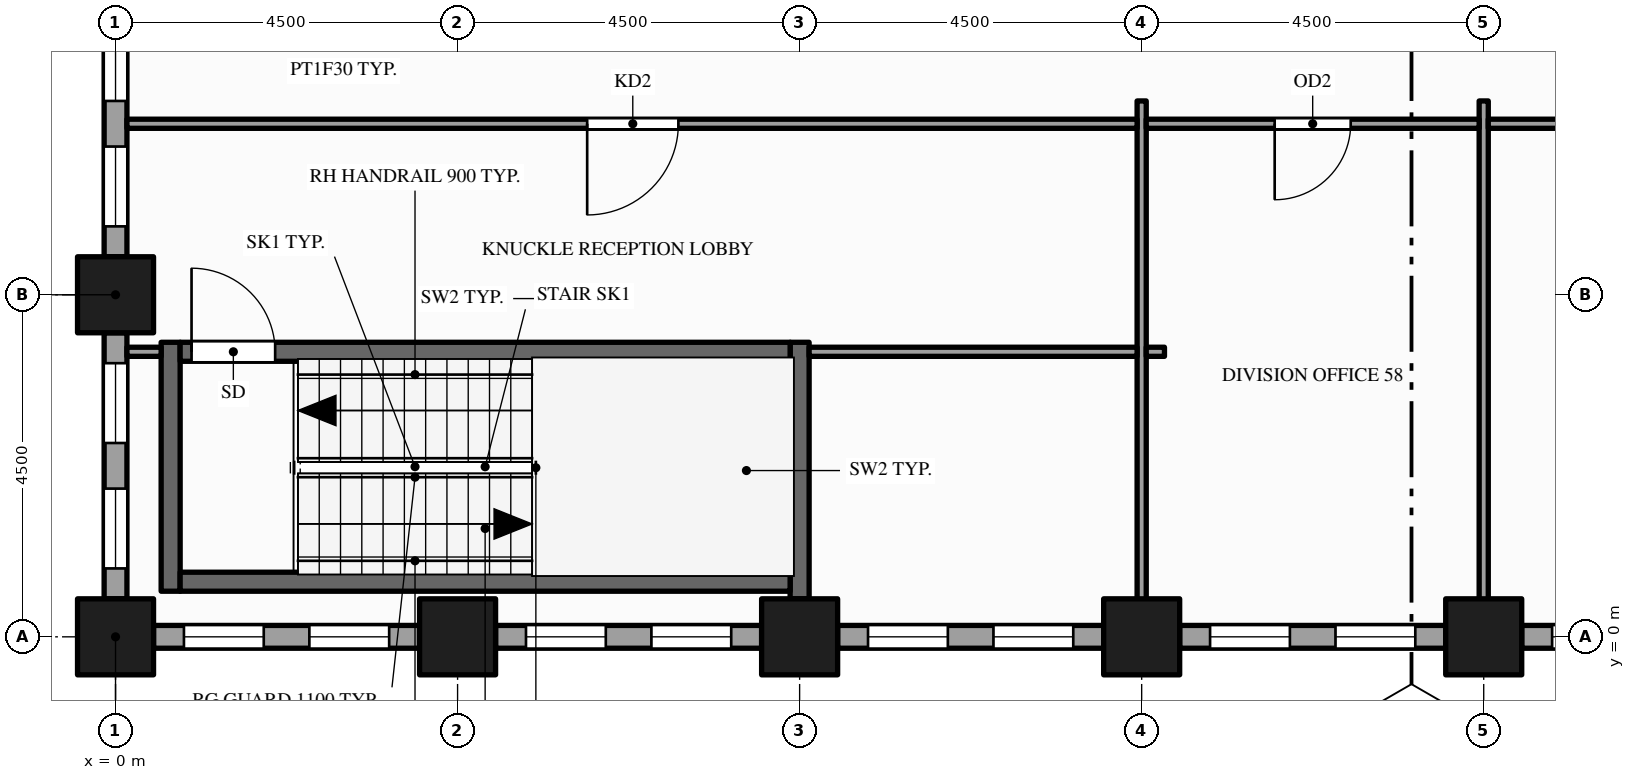
"""IFC4 building model, lengths in metres.
Left out: names, types, materials, properties, quantities, classifications, styles, units other than length and angle.
Written with IfcOpenShell. Run it as: python <this file> out.ifc"""

import sys

from ifc_helpers import new_model, si_unit, direction, frame, frame_2d, origin, origin_2d, place, context, subcontext, project, spatial, rectangle, hollow_rectangle, extrude, element, fill, save


model = new_model("IFC4")
c1 = context("Model", 3, precision=1e-05, world=origin(), true_north=direction((0.0, 1.0)))
c2 = subcontext(c1, "Body", "Model", "MODEL_VIEW")
j1 = project(units=[si_unit("LENGTHUNIT", "METRE"), si_unit("PLANEANGLEUNIT", "RADIAN")], contexts=[c1])
p1 = place(None, origin())
s1 = spatial("IfcSite", under=j1, at=p1, CompositionType="ELEMENT")
p2 = place(p1, origin())
s2 = spatial("IfcBuilding", under=s1, at=p2, CompositionType="ELEMENT")
p3 = place(p2, frame((0.0, 0.0, 103.0)))
s3 = spatial("IfcBuildingStorey", under=s2, at=p3, CompositionType="ELEMENT", Elevation=103.0)
for number, where, z_axis, x_axis in (
    (1, (0.0, 0.0, -0.15), (0.0, 0.0, 1.0), (1.0, 0.0, 0.0)),
    (2, (0.0, 4.5, -0.15), (0.0, 0.0, 1.0), (1.0, 0.0, 0.0)),
    (3, (4.5, 0.0, -0.15), (0.0, 0.0, 1.0), (1.0, 0.0, 0.0)),
    (4, (9.0, 0.0, -0.15), (0.0, 0.0, 1.0), (1.0, 0.0, 0.0)),
    (5, (13.5, 0.0, -0.15), (0.0, 0.0, 1.0), (1.0, 0.0, 0.0)),
    (6, (18.0, 0.0, -0.15), (0.0, 0.0, 1.0), (1.0, 0.0, 0.0)),
):
    element("IfcColumn", number, at=place(p3, frame(where, z_axis=z_axis, x_axis=x_axis)), inside=s3, PredefinedType="COLUMN", context=c2, shape_type="SweptSolid", body=[
        extrude(hollow_rectangle(XDim=1.0, YDim=1.0, WallThickness=0.05, at=origin_2d()), origin(), (0.0, 0.0, 1.0), 4.0),
    ])
p4 = place(p3, frame((0.0, 8.5, 0.0), z_axis=(0.0, 0.0, 1.0), x_axis=(0.0, -1.0, 0.0)))
e7 = element("IfcWall", 7, at=p4, inside=s3, PredefinedType="STANDARD", context=c2, shape_type="SweptSolid", body=[
    extrude(rectangle(XDim=3.5, YDim=0.3, at=frame_2d((1.75, 0.0))), origin(), (0.0, 0.0, 1.0), 3.154),
])
p5 = place(p4, frame((0.4, 0.0, 0.9)))
e8 = element("IfcOpeningElement", 8, at=p5, cuts=e7, PredefinedType="OPENING", context=c2, shape_type="SweptSolid", body=[
    extrude(rectangle(XDim=1.05, YDim=2.0, at=frame_2d((0.525, 1.0))), frame((0.0, 0.16, 0.0), z_axis=(0.0, -1.0, 0.0), x_axis=(1.0, 0.0, 0.0)), (0.0, 0.0, 1.0), 0.32),
])
p6 = place(p4, frame((2.05, 0.0, 0.9)))
e9 = element("IfcOpeningElement", 9, at=p6, cuts=e7, PredefinedType="OPENING", context=c2, shape_type="SweptSolid", body=[
    extrude(rectangle(XDim=1.05, YDim=2.0, at=frame_2d((0.525, 1.0))), frame((0.0, 0.16, 0.0), z_axis=(0.0, -1.0, 0.0), x_axis=(1.0, 0.0, 0.0)), (0.0, 0.0, 1.0), 0.32),
])
p7 = place(p3, frame((0.0, 4.0, 0.0), z_axis=(0.0, 0.0, 1.0), x_axis=(0.0, -1.0, 0.0)))
e10 = element("IfcWall", 10, at=p7, inside=s3, PredefinedType="STANDARD", context=c2, shape_type="SweptSolid", body=[
    extrude(rectangle(XDim=3.5, YDim=0.3, at=frame_2d((1.75, 0.0))), origin(), (0.0, 0.0, 1.0), 3.154),
])
p8 = place(p7, frame((0.4, 0.0, 0.9)))
e11 = element("IfcOpeningElement", 11, at=p8, cuts=e10, PredefinedType="OPENING", context=c2, shape_type="SweptSolid", body=[
    extrude(rectangle(XDim=1.05, YDim=2.0, at=frame_2d((0.525, 1.0))), frame((0.0, 0.16, 0.0), z_axis=(0.0, -1.0, 0.0), x_axis=(1.0, 0.0, 0.0)), (0.0, 0.0, 1.0), 0.32),
])
p9 = place(p7, frame((2.05, 0.0, 0.9)))
e12 = element("IfcOpeningElement", 12, at=p9, cuts=e10, PredefinedType="OPENING", context=c2, shape_type="SweptSolid", body=[
    extrude(rectangle(XDim=1.05, YDim=2.0, at=frame_2d((0.525, 1.0))), frame((0.0, 0.16, 0.0), z_axis=(0.0, -1.0, 0.0), x_axis=(1.0, 0.0, 0.0)), (0.0, 0.0, 1.0), 0.32),
])
p10 = place(p3, frame((0.5, 0.0, 0.0), z_axis=(0.0, 0.0, 1.0), x_axis=(1.0, 0.0, 0.0)))
e13 = element("IfcWall", 13, at=p10, inside=s3, PredefinedType="STANDARD", context=c2, shape_type="SweptSolid", body=[
    extrude(rectangle(XDim=3.5, YDim=0.3, at=frame_2d((1.75, 0.0))), origin(), (0.0, 0.0, 1.0), 3.154),
])
p11 = place(p10, frame((0.4, 0.0, 0.9)))
e14 = element("IfcOpeningElement", 14, at=p11, cuts=e13, PredefinedType="OPENING", context=c2, shape_type="SweptSolid", body=[
    extrude(rectangle(XDim=1.05, YDim=2.0, at=frame_2d((0.525, 1.0))), frame((0.0, 0.16, 0.0), z_axis=(0.0, -1.0, 0.0), x_axis=(1.0, 0.0, 0.0)), (0.0, 0.0, 1.0), 0.32),
])
p12 = place(p10, frame((2.05, 0.0, 0.9)))
e15 = element("IfcOpeningElement", 15, at=p12, cuts=e13, PredefinedType="OPENING", context=c2, shape_type="SweptSolid", body=[
    extrude(rectangle(XDim=1.05, YDim=2.0, at=frame_2d((0.525, 1.0))), frame((0.0, 0.16, 0.0), z_axis=(0.0, -1.0, 0.0), x_axis=(1.0, 0.0, 0.0)), (0.0, 0.0, 1.0), 0.32),
])
p13 = place(p3, frame((5.0, 0.0, 0.0), z_axis=(0.0, 0.0, 1.0), x_axis=(1.0, 0.0, 0.0)))
e16 = element("IfcWall", 16, at=p13, inside=s3, PredefinedType="STANDARD", context=c2, shape_type="SweptSolid", body=[
    extrude(rectangle(XDim=3.5, YDim=0.3, at=frame_2d((1.75, 0.0))), origin(), (0.0, 0.0, 1.0), 3.154),
])
p14 = place(p13, frame((0.4, 0.0, 0.9)))
e17 = element("IfcOpeningElement", 17, at=p14, cuts=e16, PredefinedType="OPENING", context=c2, shape_type="SweptSolid", body=[
    extrude(rectangle(XDim=1.05, YDim=2.0, at=frame_2d((0.525, 1.0))), frame((0.0, 0.16, 0.0), z_axis=(0.0, -1.0, 0.0), x_axis=(1.0, 0.0, 0.0)), (0.0, 0.0, 1.0), 0.32),
])
p15 = place(p13, frame((2.05, 0.0, 0.9)))
e18 = element("IfcOpeningElement", 18, at=p15, cuts=e16, PredefinedType="OPENING", context=c2, shape_type="SweptSolid", body=[
    extrude(rectangle(XDim=1.05, YDim=2.0, at=frame_2d((0.525, 1.0))), frame((0.0, 0.16, 0.0), z_axis=(0.0, -1.0, 0.0), x_axis=(1.0, 0.0, 0.0)), (0.0, 0.0, 1.0), 0.32),
])
p16 = place(p3, frame((9.5, 0.0, 0.0), z_axis=(0.0, 0.0, 1.0), x_axis=(1.0, 0.0, 0.0)))
e19 = element("IfcWall", 19, at=p16, inside=s3, PredefinedType="STANDARD", context=c2, shape_type="SweptSolid", body=[
    extrude(rectangle(XDim=3.5, YDim=0.3, at=frame_2d((1.75, 0.0))), origin(), (0.0, 0.0, 1.0), 3.154),
])
p17 = place(p16, frame((0.4, 0.0, 0.9)))
e20 = element("IfcOpeningElement", 20, at=p17, cuts=e19, PredefinedType="OPENING", context=c2, shape_type="SweptSolid", body=[
    extrude(rectangle(XDim=1.05, YDim=2.0, at=frame_2d((0.525, 1.0))), frame((0.0, 0.16, 0.0), z_axis=(0.0, -1.0, 0.0), x_axis=(1.0, 0.0, 0.0)), (0.0, 0.0, 1.0), 0.32),
])
p18 = place(p16, frame((2.05, 0.0, 0.9)))
e21 = element("IfcOpeningElement", 21, at=p18, cuts=e19, PredefinedType="OPENING", context=c2, shape_type="SweptSolid", body=[
    extrude(rectangle(XDim=1.05, YDim=2.0, at=frame_2d((0.525, 1.0))), frame((0.0, 0.16, 0.0), z_axis=(0.0, -1.0, 0.0), x_axis=(1.0, 0.0, 0.0)), (0.0, 0.0, 1.0), 0.32),
])
p19 = place(p3, frame((14.0, 0.0, 0.0), z_axis=(0.0, 0.0, 1.0), x_axis=(1.0, 0.0, 0.0)))
e22 = element("IfcWall", 22, at=p19, inside=s3, PredefinedType="STANDARD", context=c2, shape_type="SweptSolid", body=[
    extrude(rectangle(XDim=3.5, YDim=0.3, at=frame_2d((1.75, 0.0))), origin(), (0.0, 0.0, 1.0), 3.154),
])
p20 = place(p19, frame((0.4, 0.0, 0.9)))
e23 = element("IfcOpeningElement", 23, at=p20, cuts=e22, PredefinedType="OPENING", context=c2, shape_type="SweptSolid", body=[
    extrude(rectangle(XDim=1.05, YDim=2.0, at=frame_2d((0.525, 1.0))), frame((0.0, 0.16, 0.0), z_axis=(0.0, -1.0, 0.0), x_axis=(1.0, 0.0, 0.0)), (0.0, 0.0, 1.0), 0.32),
])
p21 = place(p19, frame((2.05, 0.0, 0.9)))
e24 = element("IfcOpeningElement", 24, at=p21, cuts=e22, PredefinedType="OPENING", context=c2, shape_type="SweptSolid", body=[
    extrude(rectangle(XDim=1.05, YDim=2.0, at=frame_2d((0.525, 1.0))), frame((0.0, 0.16, 0.0), z_axis=(0.0, -1.0, 0.0), x_axis=(1.0, 0.0, 0.0)), (0.0, 0.0, 1.0), 0.32),
])
p22 = place(p3, frame((18.5, 0.0, 0.0), z_axis=(0.0, 0.0, 1.0), x_axis=(1.0, 0.0, 0.0)))
e25 = element("IfcWall", 25, at=p22, inside=s3, PredefinedType="STANDARD", context=c2, shape_type="SweptSolid", body=[
    extrude(rectangle(XDim=3.5, YDim=0.3, at=frame_2d((1.75, 0.0))), origin(), (0.0, 0.0, 1.0), 3.154),
])
p23 = place(p22, frame((0.4, 0.0, 0.9)))
e26 = element("IfcOpeningElement", 26, at=p23, cuts=e25, PredefinedType="OPENING", context=c2, shape_type="SweptSolid", body=[
    extrude(rectangle(XDim=1.05, YDim=2.0, at=frame_2d((0.525, 1.0))), frame((0.0, 0.16, 0.0), z_axis=(0.0, -1.0, 0.0), x_axis=(1.0, 0.0, 0.0)), (0.0, 0.0, 1.0), 0.32),
])
p24 = place(p22, frame((2.05, 0.0, 0.9)))
e27 = element("IfcOpeningElement", 27, at=p24, cuts=e25, PredefinedType="OPENING", context=c2, shape_type="SweptSolid", body=[
    extrude(rectangle(XDim=1.05, YDim=2.0, at=frame_2d((0.525, 1.0))), frame((0.0, 0.16, 0.0), z_axis=(0.0, -1.0, 0.0), x_axis=(1.0, 0.0, 0.0)), (0.0, 0.0, 1.0), 0.32),
])
p25 = place(p3, frame((0.725, 0.6, 0.0), z_axis=(0.0, 0.0, 1.0), x_axis=(0.0, 1.0, 0.0)))
e28 = element("IfcWall", 28, at=p25, inside=s3, PredefinedType="SHEAR", context=c2, shape_type="SweptSolid", body=[
    extrude(rectangle(XDim=3.275, YDim=0.25, at=frame_2d((1.637, 0.0))), origin(), (0.0, 0.0, 1.0), 3.85),
])
p26 = place(p3, frame((9.0, 0.5, 0.0), z_axis=(0.0, 0.0, 1.0), x_axis=(0.0, 1.0, 0.0)))
e29 = element("IfcWall", 29, at=p26, inside=s3, PredefinedType="SHEAR", context=c2, shape_type="SweptSolid", body=[
    extrude(rectangle(XDim=3.375, YDim=0.25, at=frame_2d((1.688, 0.0))), origin(), (0.0, 0.0, 1.0), 3.85),
])
for number, where, z_axis, x_axis in (
    (30, (13.5, 0.15, 0.0), (0.0, 0.0, 1.0), (0.0, 1.0, 0.0)),
    (31, (18.0, 0.15, 0.0), (0.0, 0.0, 1.0), (0.0, 1.0, 0.0)),
):
    element("IfcWall", number, at=place(p3, frame(where, z_axis=z_axis, x_axis=x_axis)), inside=s3, PredefinedType="PARTITIONING", context=c2, shape_type="SweptSolid", body=[
        extrude(rectangle(XDim=6.9, YDim=0.12, at=frame_2d((3.45, 0.0))), origin(), (0.0, 0.0, 1.0), 2.938),
    ])
p27 = place(p3, frame((0.85, 0.725, 0.0), z_axis=(0.0, 0.0, 1.0), x_axis=(1.0, 0.0, 0.0)))
e32 = element("IfcWall", 32, at=p27, inside=s3, PredefinedType="SHEAR", context=c2, shape_type="SweptSolid", body=[
    extrude(rectangle(XDim=8.025, YDim=0.25, at=frame_2d((4.012, 0.0))), origin(), (0.0, 0.0, 1.0), 3.85),
])
p28 = place(p3, frame((0.15, 3.75, 0.0), z_axis=(0.0, 0.0, 1.0), x_axis=(1.0, 0.0, 0.0)))
e33 = element("IfcWall", 33, at=p28, inside=s3, PredefinedType="PARTITIONING", context=c2, shape_type="SweptSolid", body=[
    extrude(rectangle(XDim=0.45, YDim=0.12, at=frame_2d((0.225, 0.0))), origin(), (0.0, 0.0, 1.0), 3.154),
])
p29 = place(p3, frame((0.85, 3.75, 0.0), z_axis=(0.0, 0.0, 1.0), x_axis=(1.0, 0.0, 0.0)))
e34 = element("IfcWall", 34, at=p29, inside=s3, PredefinedType="SHEAR", context=c2, shape_type="SweptSolid", body=[
    extrude(rectangle(XDim=8.025, YDim=0.25, at=frame_2d((4.012, 0.0))), origin(), (0.0, 0.0, 1.0), 3.85),
])
p30 = place(p29, frame((0.15, 0.0, 0.0)))
e35 = element("IfcOpeningElement", 35, at=p30, cuts=e34, PredefinedType="OPENING", context=c2, shape_type="SweptSolid", body=[
    extrude(rectangle(XDim=1.1, YDim=2.1, at=frame_2d((0.55, 1.05))), frame((0.0, 0.135, 0.0), z_axis=(0.0, -1.0, 0.0), x_axis=(1.0, 0.0, 0.0)), (0.0, 0.0, 1.0), 0.27),
])
p31 = place(p3, frame((9.125, 3.75, 0.0), z_axis=(0.0, 0.0, 1.0), x_axis=(1.0, 0.0, 0.0)))
e36 = element("IfcWall", 36, at=p31, inside=s3, PredefinedType="PARTITIONING", context=c2, shape_type="SweptSolid", body=[
    extrude(rectangle(XDim=4.315, YDim=0.12, at=frame_2d((2.157, 0.0))), origin(), (0.0, 0.0, 1.0), 2.938),
])
p32 = place(p3, frame((13.56, 3.75, 0.0), z_axis=(0.0, 0.0, 1.0), x_axis=(1.0, 0.0, 0.0)))
e37 = element("IfcWall", 37, at=p32, inside=s3, PredefinedType="PARTITIONING", context=c2, shape_type="SweptSolid", body=[
    extrude(rectangle(XDim=0.24, YDim=0.12, at=frame_2d((0.12, 0.0))), origin(), (0.0, 0.0, 1.0), 2.938),
])
p33 = place(p3, frame((0.15, 6.75, 0.0), z_axis=(0.0, 0.0, 1.0), x_axis=(1.0, 0.0, 0.0)))
e38 = element("IfcWall", 38, at=p33, inside=s3, PredefinedType="PARTITIONING", context=c2, shape_type="SweptSolid", body=[
    extrude(rectangle(XDim=13.29, YDim=0.12, at=frame_2d((6.645, 0.0))), origin(), (0.0, 0.0, 1.0), 2.938),
])
p34 = place(p33, frame((6.055, 0.0, 0.0)))
e39 = element("IfcOpeningElement", 39, at=p34, cuts=e38, PredefinedType="OPENING", context=c2, shape_type="SweptSolid", body=[
    extrude(rectangle(XDim=1.2, YDim=2.1, at=frame_2d((0.6, 1.05))), frame((0.0, 0.07, 0.0), z_axis=(0.0, -1.0, 0.0), x_axis=(1.0, 0.0, 0.0)), (0.0, 0.0, 1.0), 0.14),
])
p35 = place(p3, frame((13.56, 6.75, 0.0), z_axis=(0.0, 0.0, 1.0), x_axis=(1.0, 0.0, 0.0)))
e40 = element("IfcWall", 40, at=p35, inside=s3, PredefinedType="PARTITIONING", context=c2, shape_type="SweptSolid", body=[
    extrude(rectangle(XDim=4.38, YDim=0.12, at=frame_2d((2.19, 0.0))), origin(), (0.0, 0.0, 1.0), 2.938),
])
p36 = place(p35, frame((1.69, 0.0, 0.0)))
e41 = element("IfcOpeningElement", 41, at=p36, cuts=e40, PredefinedType="OPENING", context=c2, shape_type="SweptSolid", body=[
    extrude(rectangle(XDim=1.0, YDim=2.1, at=frame_2d((0.5, 1.05))), frame((0.0, 0.07, 0.0), z_axis=(0.0, -1.0, 0.0), x_axis=(1.0, 0.0, 0.0)), (0.0, 0.0, 1.0), 0.14),
])
p37 = place(p3, frame((18.06, 6.75, 0.0), z_axis=(0.0, 0.0, 1.0), x_axis=(1.0, 0.0, 0.0)))
e42 = element("IfcWall", 42, at=p37, inside=s3, PredefinedType="PARTITIONING", context=c2, shape_type="SweptSolid", body=[
    extrude(rectangle(XDim=4.38, YDim=0.12, at=frame_2d((2.19, 0.0))), origin(), (0.0, 0.0, 1.0), 2.938),
])
p38 = place(p37, frame((1.69, 0.0, 0.0)))
e43 = element("IfcOpeningElement", 43, at=p38, cuts=e42, PredefinedType="OPENING", context=c2, shape_type="SweptSolid", body=[
    extrude(rectangle(XDim=1.0, YDim=2.1, at=frame_2d((0.5, 1.05))), frame((0.0, 0.07, 0.0), z_axis=(0.0, -1.0, 0.0), x_axis=(1.0, 0.0, 0.0)), (0.0, 0.0, 1.0), 0.14),
])
p39 = place(p5, origin())
e44 = element("IfcWindow", 44, at=p39, inside=s3, PartitioningType="SINGLE_PANEL", PredefinedType="WINDOW", context=c2, shape_type="SweptSolid", body=[
    extrude(rectangle(XDim=1.05, YDim=2.0, at=frame_2d((0.525, 1.0))), frame((0.0, 0.03, 0.0), z_axis=(0.0, -1.0, 0.0), x_axis=(1.0, 0.0, 0.0)), (0.0, 0.0, 1.0), 0.06),
])
fill(e8, e44)
p40 = place(p6, origin())
e45 = element("IfcWindow", 45, at=p40, inside=s3, PartitioningType="SINGLE_PANEL", PredefinedType="WINDOW", context=c2, shape_type="SweptSolid", body=[
    extrude(rectangle(XDim=1.05, YDim=2.0, at=frame_2d((0.525, 1.0))), frame((0.0, 0.03, 0.0), z_axis=(0.0, -1.0, 0.0), x_axis=(1.0, 0.0, 0.0)), (0.0, 0.0, 1.0), 0.06),
])
fill(e9, e45)
p41 = place(p8, origin())
e46 = element("IfcWindow", 46, at=p41, inside=s3, PartitioningType="SINGLE_PANEL", PredefinedType="WINDOW", context=c2, shape_type="SweptSolid", body=[
    extrude(rectangle(XDim=1.05, YDim=2.0, at=frame_2d((0.525, 1.0))), frame((0.0, 0.03, 0.0), z_axis=(0.0, -1.0, 0.0), x_axis=(1.0, 0.0, 0.0)), (0.0, 0.0, 1.0), 0.06),
])
fill(e11, e46)
p42 = place(p9, origin())
e47 = element("IfcWindow", 47, at=p42, inside=s3, PartitioningType="SINGLE_PANEL", PredefinedType="WINDOW", context=c2, shape_type="SweptSolid", body=[
    extrude(rectangle(XDim=1.05, YDim=2.0, at=frame_2d((0.525, 1.0))), frame((0.0, 0.03, 0.0), z_axis=(0.0, -1.0, 0.0), x_axis=(1.0, 0.0, 0.0)), (0.0, 0.0, 1.0), 0.06),
])
fill(e12, e47)
p43 = place(p11, origin())
e48 = element("IfcWindow", 48, at=p43, inside=s3, PartitioningType="SINGLE_PANEL", PredefinedType="WINDOW", context=c2, shape_type="SweptSolid", body=[
    extrude(rectangle(XDim=1.05, YDim=2.0, at=frame_2d((0.525, 1.0))), frame((0.0, 0.03, 0.0), z_axis=(0.0, -1.0, 0.0), x_axis=(1.0, 0.0, 0.0)), (0.0, 0.0, 1.0), 0.06),
])
fill(e14, e48)
p44 = place(p12, origin())
e49 = element("IfcWindow", 49, at=p44, inside=s3, PartitioningType="SINGLE_PANEL", PredefinedType="WINDOW", context=c2, shape_type="SweptSolid", body=[
    extrude(rectangle(XDim=1.05, YDim=2.0, at=frame_2d((0.525, 1.0))), frame((0.0, 0.03, 0.0), z_axis=(0.0, -1.0, 0.0), x_axis=(1.0, 0.0, 0.0)), (0.0, 0.0, 1.0), 0.06),
])
fill(e15, e49)
p45 = place(p14, origin())
e50 = element("IfcWindow", 50, at=p45, inside=s3, PartitioningType="SINGLE_PANEL", PredefinedType="WINDOW", context=c2, shape_type="SweptSolid", body=[
    extrude(rectangle(XDim=1.05, YDim=2.0, at=frame_2d((0.525, 1.0))), frame((0.0, 0.03, 0.0), z_axis=(0.0, -1.0, 0.0), x_axis=(1.0, 0.0, 0.0)), (0.0, 0.0, 1.0), 0.06),
])
fill(e17, e50)
p46 = place(p15, origin())
e51 = element("IfcWindow", 51, at=p46, inside=s3, PartitioningType="SINGLE_PANEL", PredefinedType="WINDOW", context=c2, shape_type="SweptSolid", body=[
    extrude(rectangle(XDim=1.05, YDim=2.0, at=frame_2d((0.525, 1.0))), frame((0.0, 0.03, 0.0), z_axis=(0.0, -1.0, 0.0), x_axis=(1.0, 0.0, 0.0)), (0.0, 0.0, 1.0), 0.06),
])
fill(e18, e51)
p47 = place(p17, origin())
e52 = element("IfcWindow", 52, at=p47, inside=s3, PartitioningType="SINGLE_PANEL", PredefinedType="WINDOW", context=c2, shape_type="SweptSolid", body=[
    extrude(rectangle(XDim=1.05, YDim=2.0, at=frame_2d((0.525, 1.0))), frame((0.0, 0.03, 0.0), z_axis=(0.0, -1.0, 0.0), x_axis=(1.0, 0.0, 0.0)), (0.0, 0.0, 1.0), 0.06),
])
fill(e20, e52)
p48 = place(p18, origin())
e53 = element("IfcWindow", 53, at=p48, inside=s3, PartitioningType="SINGLE_PANEL", PredefinedType="WINDOW", context=c2, shape_type="SweptSolid", body=[
    extrude(rectangle(XDim=1.05, YDim=2.0, at=frame_2d((0.525, 1.0))), frame((0.0, 0.03, 0.0), z_axis=(0.0, -1.0, 0.0), x_axis=(1.0, 0.0, 0.0)), (0.0, 0.0, 1.0), 0.06),
])
fill(e21, e53)
p49 = place(p20, origin())
e54 = element("IfcWindow", 54, at=p49, inside=s3, PartitioningType="SINGLE_PANEL", PredefinedType="WINDOW", context=c2, shape_type="SweptSolid", body=[
    extrude(rectangle(XDim=1.05, YDim=2.0, at=frame_2d((0.525, 1.0))), frame((0.0, 0.03, 0.0), z_axis=(0.0, -1.0, 0.0), x_axis=(1.0, 0.0, 0.0)), (0.0, 0.0, 1.0), 0.06),
])
fill(e23, e54)
p50 = place(p21, origin())
e55 = element("IfcWindow", 55, at=p50, inside=s3, PartitioningType="SINGLE_PANEL", PredefinedType="WINDOW", context=c2, shape_type="SweptSolid", body=[
    extrude(rectangle(XDim=1.05, YDim=2.0, at=frame_2d((0.525, 1.0))), frame((0.0, 0.03, 0.0), z_axis=(0.0, -1.0, 0.0), x_axis=(1.0, 0.0, 0.0)), (0.0, 0.0, 1.0), 0.06),
])
fill(e24, e55)
p51 = place(p23, origin())
e56 = element("IfcWindow", 56, at=p51, inside=s3, PartitioningType="SINGLE_PANEL", PredefinedType="WINDOW", context=c2, shape_type="SweptSolid", body=[
    extrude(rectangle(XDim=1.05, YDim=2.0, at=frame_2d((0.525, 1.0))), frame((0.0, 0.03, 0.0), z_axis=(0.0, -1.0, 0.0), x_axis=(1.0, 0.0, 0.0)), (0.0, 0.0, 1.0), 0.06),
])
fill(e26, e56)
p52 = place(p30, origin())
e57 = element("IfcDoor", 57, at=p52, inside=s3, OperationType="SINGLE_SWING_LEFT", PredefinedType="DOOR", context=c2, shape_type="SweptSolid", body=[
    extrude(rectangle(XDim=1.1, YDim=2.1, at=frame_2d((0.55, 1.05))), frame((0.0, 0.025, 0.0), z_axis=(0.0, -1.0, 0.0), x_axis=(1.0, 0.0, 0.0)), (0.0, 0.0, 1.0), 0.05),
])
fill(e35, e57)
p53 = place(p34, origin())
e58 = element("IfcDoor", 58, at=p53, inside=s3, OperationType="SINGLE_SWING_LEFT", PredefinedType="DOOR", context=c2, shape_type="SweptSolid", body=[
    extrude(rectangle(XDim=1.2, YDim=2.1, at=frame_2d((0.6, 1.05))), frame((0.0, 0.025, 0.0), z_axis=(0.0, -1.0, 0.0), x_axis=(1.0, 0.0, 0.0)), (0.0, 0.0, 1.0), 0.05),
])
fill(e39, e58)
p54 = place(p36, origin())
e59 = element("IfcDoor", 59, at=p54, inside=s3, OperationType="SINGLE_SWING_LEFT", PredefinedType="DOOR", context=c2, shape_type="SweptSolid", body=[
    extrude(rectangle(XDim=1.0, YDim=2.1, at=frame_2d((0.5, 1.05))), frame((0.0, 0.025, 0.0), z_axis=(0.0, -1.0, 0.0), x_axis=(1.0, 0.0, 0.0)), (0.0, 0.0, 1.0), 0.05),
])
fill(e41, e59)
save(model, sys.argv[1])
